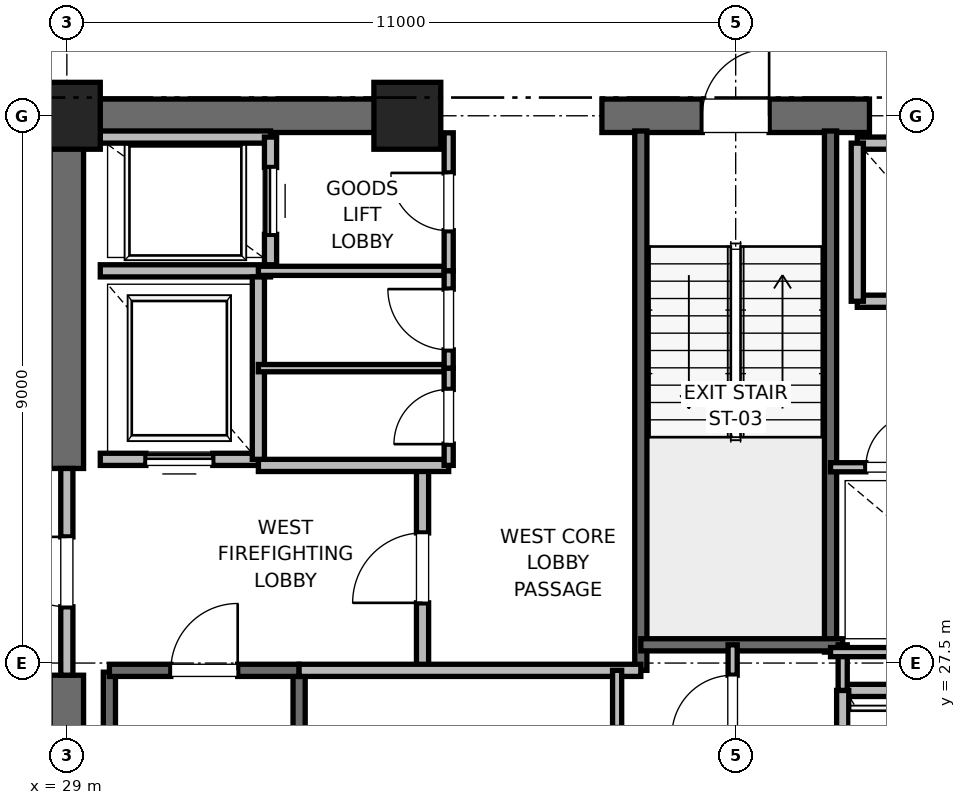
"""IFC4 building model, lengths in metres.
Left out: names, types, materials, properties, quantities, classifications, styles, units other than length and angle.
Written with IfcOpenShell. Run it as: python <this file> out.ifc"""

import sys

from ifc_helpers import new_model, si_unit, direction, frame, frame_2d, origin, origin_2d, place, context, subcontext, project, spatial, rectangle, extrude, element, fill, save


model = new_model("IFC4")
c1 = context("Model", 3, precision=1e-05, world=origin(), true_north=direction((0.0, 1.0)))
c2 = subcontext(c1, "Body", "Model", "MODEL_VIEW")
j1 = project(units=[si_unit("LENGTHUNIT", "METRE"), si_unit("PLANEANGLEUNIT", "RADIAN")], contexts=[c1])
p1 = place(None, origin())
s1 = spatial("IfcSite", under=j1, at=p1, CompositionType="ELEMENT")
p2 = place(p1, origin())
s2 = spatial("IfcBuilding", under=s1, at=p2, CompositionType="ELEMENT")
p3 = place(p2, frame((0.0, 0.0, 160.4)))
s3 = spatial("IfcBuildingStorey", under=s2, at=p3, CompositionType="ELEMENT", Elevation=160.4)
for number, where, z_axis, x_axis in (
    (1, (29.0, 36.5, 0.0), (0.0, 0.0, 1.0), (1.0, 0.0, 0.0)),
    (2, (34.6, 36.5, 0.0), (0.0, 0.0, 1.0), (1.0, 0.0, 0.0)),
):
    element("IfcColumn", number, at=place(p3, frame(where, z_axis=z_axis, x_axis=x_axis)), inside=s3, PredefinedType="PILASTER", context=c2, shape_type="SweptSolid", body=[
        extrude(rectangle(XDim=1.1, YDim=1.1, at=origin_2d()), origin(), (0.0, 0.0, 1.0), 4.0),
    ])
p4 = place(p3, frame((29.0, 36.5, 0.0), z_axis=(0.0, 0.0, 1.0), x_axis=(1.0, 0.0, 0.0)))
e3 = element("IfcWall", 3, at=p4, inside=s3, PredefinedType="SHEAR", context=c2, shape_type="SweptSolid", body=[
    extrude(rectangle(XDim=5.8, YDim=0.55, at=frame_2d((2.9, 0.0))), origin(), (0.0, 0.0, 1.0), 3.775),
])
p5 = place(p3, frame((37.8, 36.5, 0.0), z_axis=(0.0, 0.0, 1.0), x_axis=(1.0, 0.0, 0.0)))
e4 = element("IfcWall", 4, at=p5, inside=s3, PredefinedType="SHEAR", context=c2, shape_type="SweptSolid", body=[
    extrude(rectangle(XDim=4.4, YDim=0.55, at=frame_2d((2.2, 0.0))), origin(), (0.0, 0.0, 1.0), 3.775),
])
p6 = place(p5, frame((1.65, 0.0, 0.0)))
e5 = element("IfcOpeningElement", 5, at=p6, cuts=e4, PredefinedType="OPENING", context=c2, shape_type="SweptSolid", body=[
    extrude(rectangle(XDim=1.1, YDim=2.15, at=frame_2d((0.55, 1.075))), frame((0.0, 0.275, 0.0), z_axis=(0.0, -1.0, 0.0), x_axis=(1.0, 0.0, 0.0)), (0.0, 0.0, 1.0), 0.55),
])
p7 = place(p3, frame((29.0, 18.5, 0.0), z_axis=(0.0, 0.0, 1.0), x_axis=(0.0, 1.0, 0.0)))
e6 = element("IfcWall", 6, at=p7, inside=s3, PredefinedType="SHEAR", context=c2, shape_type="SweptSolid", body=[
    extrude(rectangle(XDim=8.8, YDim=0.55, at=frame_2d((4.4, 0.0))), origin(), (0.0, 0.0, 1.0), 3.775),
])
p8 = place(p3, frame((29.0, 30.7, 0.0), z_axis=(0.0, 0.0, 1.0), x_axis=(0.0, 1.0, 0.0)))
e7 = element("IfcWall", 7, at=p8, inside=s3, PredefinedType="SHEAR", context=c2, shape_type="SweptSolid", body=[
    extrude(rectangle(XDim=5.8, YDim=0.55, at=frame_2d((2.9, 0.0))), origin(), (0.0, 0.0, 1.0), 3.775),
])
p9 = place(p3, frame((29.7, 19.2, 0.0), z_axis=(0.0, 0.0, 1.0), x_axis=(0.0, 1.0, 0.0)))
e8 = element("IfcWall", 8, at=p9, inside=s3, PredefinedType="SOLIDWALL", context=c2, shape_type="SweptSolid", body=[
    extrude(rectangle(XDim=8.15, YDim=0.2, at=frame_2d((4.075, 0.0))), origin(), (0.0, 0.0, 1.0), 3.775),
])
p10 = place(p3, frame((32.82, 18.6, 0.0), z_axis=(0.0, 0.0, 1.0), x_axis=(0.0, 1.0, 0.0)))
e9 = element("IfcWall", 9, at=p10, inside=s3, PredefinedType="SOLIDWALL", context=c2, shape_type="SweptSolid", body=[
    extrude(rectangle(XDim=8.78, YDim=0.2, at=frame_2d((4.39, 0.0))), origin(), (0.0, 0.0, 1.0), 3.775),
])
p11 = place(p3, frame((29.7, 27.38, 0.0), z_axis=(0.0, 0.0, 1.0), x_axis=(1.0, 0.0, 0.0)))
e10 = element("IfcWall", 10, at=p11, inside=s3, PredefinedType="SOLIDWALL", context=c2, shape_type="SweptSolid", body=[
    extrude(rectangle(XDim=3.12, YDim=0.2, at=frame_2d((1.56, 0.0))), origin(), (0.0, 0.0, 1.0), 3.775),
])
p12 = place(p11, frame((1.01, 0.0, 0.0)))
e11 = element("IfcOpeningElement", 11, at=p12, cuts=e10, PredefinedType="OPENING", context=c2, shape_type="SweptSolid", body=[
    extrude(rectangle(XDim=1.1, YDim=2.15, at=frame_2d((0.55, 1.075))), frame((0.0, 0.1, 0.0), z_axis=(0.0, -1.0, 0.0), x_axis=(1.0, 0.0, 0.0)), (0.0, 0.0, 1.0), 0.2),
])
p13 = place(p3, frame((38.44, 27.38, 0.0), z_axis=(0.0, 0.0, 1.0), x_axis=(0.0, 1.0, 0.0)))
e12 = element("IfcWall", 12, at=p13, inside=s3, PredefinedType="SOLIDWALL", context=c2, shape_type="SweptSolid", body=[
    extrude(rectangle(XDim=8.87, YDim=0.2, at=frame_2d((4.435, 0.0))), origin(), (0.0, 0.0, 1.0), 3.775),
])
p14 = place(p3, frame((41.56, 27.68, 0.0), z_axis=(0.0, 0.0, 1.0), x_axis=(0.0, 1.0, 0.0)))
e13 = element("IfcWall", 13, at=p14, inside=s3, PredefinedType="SOLIDWALL", context=c2, shape_type="SweptSolid", body=[
    extrude(rectangle(XDim=8.57, YDim=0.2, at=frame_2d((4.285, 0.0))), origin(), (0.0, 0.0, 1.0), 3.775),
])
p15 = place(p3, frame((38.44, 27.8, 0.0), z_axis=(0.0, 0.0, 1.0), x_axis=(1.0, 0.0, 0.0)))
e14 = element("IfcWall", 14, at=p15, inside=s3, PredefinedType="SOLIDWALL", context=c2, shape_type="SweptSolid", body=[
    extrude(rectangle(XDim=3.32, YDim=0.2, at=frame_2d((1.66, 0.0))), origin(), (0.0, 0.0, 1.0), 3.775),
])
p16 = place(p3, frame((34.85, 27.38, 0.0), z_axis=(0.0, 0.0, 1.0), x_axis=(0.0, 1.0, 0.0)))
e15 = element("IfcWall", 15, at=p16, inside=s3, PredefinedType="PARTITIONING", context=c2, shape_type="SweptSolid", body=[
    extrude(rectangle(XDim=3.37, YDim=0.2, at=frame_2d((1.685, 0.0))), origin(), (0.0, 0.0, 1.0), 3.775),
])
p17 = place(p16, frame((1.11, 0.0, 0.0)))
e16 = element("IfcOpeningElement", 16, at=p17, cuts=e15, PredefinedType="OPENING", context=c2, shape_type="SweptSolid", body=[
    extrude(rectangle(XDim=1.15, YDim=2.2, at=frame_2d((0.575, 1.1))), frame((0.0, 0.1, 0.0), z_axis=(0.0, -1.0, 0.0), x_axis=(1.0, 0.0, 0.0)), (0.0, 0.0, 1.0), 0.2),
])
p18 = place(p3, frame((29.0, 27.3, 0.0), z_axis=(0.0, 0.0, 1.0), x_axis=(0.0, 1.0, 0.0)))
e17 = element("IfcWall", 17, at=p18, inside=s3, PredefinedType="PARTITIONING", context=c2, shape_type="SweptSolid", body=[
    extrude(rectangle(XDim=3.4, YDim=0.2, at=frame_2d((1.7, 0.0))), origin(), (0.0, 0.0, 1.0), 2.755),
])
p19 = place(p18, frame((1.125, 0.0, 0.0)))
e18 = element("IfcOpeningElement", 18, at=p19, cuts=e17, PredefinedType="OPENING", context=c2, shape_type="SweptSolid", body=[
    extrude(rectangle(XDim=1.15, YDim=2.2, at=frame_2d((0.575, 1.1))), frame((0.0, 0.1, 0.0), z_axis=(0.0, -1.0, 0.0), x_axis=(1.0, 0.0, 0.0)), (0.0, 0.0, 1.0), 0.2),
])
p20 = place(p3, frame((32.82, 27.38, 0.0), z_axis=(0.0, 0.0, 1.0), x_axis=(1.0, 0.0, 0.0)))
e19 = element("IfcWall", 19, at=p20, inside=s3, PredefinedType="PARTITIONING", context=c2, shape_type="SweptSolid", body=[
    extrude(rectangle(XDim=5.62, YDim=0.2, at=frame_2d((2.81, 0.0))), origin(), (0.0, 0.0, 1.0), 3.775),
])
p21 = place(p3, frame((32.15, 30.75, 0.0), z_axis=(0.0, 0.0, 1.0), x_axis=(1.0, 0.0, 0.0)))
e20 = element("IfcWall", 20, at=p21, inside=s3, PredefinedType="PARTITIONING", context=c2, shape_type="SweptSolid", body=[
    extrude(rectangle(XDim=3.13, YDim=0.2, at=frame_2d((1.565, 0.0))), origin(), (0.0, 0.0, 1.0), 3.775),
])
p22 = place(p3, frame((29.55, 30.85, 0.0), z_axis=(0.0, 0.0, 1.0), x_axis=(1.0, 0.0, 0.0)))
e21 = element("IfcWall", 21, at=p22, inside=s3, PredefinedType="SOLIDWALL", context=c2, shape_type="SweptSolid", body=[
    extrude(rectangle(XDim=2.6, YDim=0.2, at=frame_2d((1.3, 0.0))), origin(), (0.0, 0.0, 1.0), 2.755),
])
p23 = place(p22, frame((0.75, 0.0, 0.0)))
e22 = element("IfcOpeningElement", 22, at=p23, cuts=e21, PredefinedType="OPENING", context=c2, shape_type="SweptSolid", body=[
    extrude(rectangle(XDim=1.1, YDim=2.2, at=frame_2d((0.55, 1.1))), frame((0.0, 0.1, 0.0), z_axis=(0.0, -1.0, 0.0), x_axis=(1.0, 0.0, 0.0)), (0.0, 0.0, 1.0), 0.2),
])
p24 = place(p3, frame((29.55, 33.95, 0.0), z_axis=(0.0, 0.0, 1.0), x_axis=(1.0, 0.0, 0.0)))
e23 = element("IfcWall", 23, at=p24, inside=s3, PredefinedType="SOLIDWALL", context=c2, shape_type="SweptSolid", body=[
    extrude(rectangle(XDim=2.8, YDim=0.2, at=frame_2d((1.4, 0.0))), origin(), (0.0, 0.0, 1.0), 3.775),
])
p25 = place(p3, frame((32.15, 30.85, 0.0), z_axis=(0.0, 0.0, 1.0), x_axis=(0.0, 1.0, 0.0)))
e24 = element("IfcWall", 24, at=p25, inside=s3, PredefinedType="SOLIDWALL", context=c2, shape_type="SweptSolid", body=[
    extrude(rectangle(XDim=3.0, YDim=0.2, at=frame_2d((1.5, 0.0))), origin(), (0.0, 0.0, 1.0), 3.775),
])
p26 = place(p3, frame((32.35, 36.15, 0.0), z_axis=(0.0, 0.0, 1.0), x_axis=(-1.0, 0.0, 0.0)))
e25 = element("IfcWall", 25, at=p26, inside=s3, PredefinedType="SOLIDWALL", context=c2, shape_type="SweptSolid", body=[
    extrude(rectangle(XDim=2.8, YDim=0.2, at=frame_2d((1.4, 0.0))), origin(), (0.0, 0.0, 1.0), 2.985),
])
p27 = place(p3, frame((32.35, 34.05, 0.0), z_axis=(0.0, 0.0, 1.0), x_axis=(0.0, 1.0, 0.0)))
e26 = element("IfcWall", 26, at=p27, inside=s3, PredefinedType="SOLIDWALL", context=c2, shape_type="SweptSolid", body=[
    extrude(rectangle(XDim=2.1, YDim=0.2, at=frame_2d((1.05, 0.0))), origin(), (0.0, 0.0, 1.0), 3.775),
])
p28 = place(p27, frame((0.5, 0.0, 0.0)))
e27 = element("IfcOpeningElement", 27, at=p28, cuts=e26, PredefinedType="OPENING", context=c2, shape_type="SweptSolid", body=[
    extrude(rectangle(XDim=1.1, YDim=2.2, at=frame_2d((0.55, 1.1))), frame((0.0, 0.1, 0.0), z_axis=(0.0, -1.0, 0.0), x_axis=(1.0, 0.0, 0.0)), (0.0, 0.0, 1.0), 0.2),
])
p29 = place(p3, frame((43.44, 27.05, 0.0), z_axis=(0.0, 0.0, 1.0), x_axis=(-1.0, 0.0, 0.0)))
e28 = element("IfcWall", 28, at=p29, inside=s3, PredefinedType="SOLIDWALL", context=c2, shape_type="SweptSolid", body=[
    extrude(rectangle(XDim=1.68, YDim=0.2, at=frame_2d((0.84, 0.0))), origin(), (0.0, 0.0, 1.0), 3.775),
])
p30 = place(p3, frame((41.76, 27.05, 0.0), z_axis=(0.0, 0.0, 1.0), x_axis=(0.0, -1.0, 0.0)))
e29 = element("IfcWall", 29, at=p30, inside=s3, PredefinedType="SOLIDWALL", context=c2, shape_type="SweptSolid", body=[
    extrude(rectangle(XDim=2.6, YDim=0.2, at=frame_2d((1.3, 0.0))), origin(), (0.0, 0.0, 1.0), 3.775),
])
p31 = place(p3, frame((42.0, 33.45, 0.0), z_axis=(0.0, 0.0, 1.0), x_axis=(1.0, 0.0, 0.0)))
e30 = element("IfcWall", 30, at=p31, inside=s3, PredefinedType="SOLIDWALL", context=c2, shape_type="SweptSolid", body=[
    extrude(rectangle(XDim=2.3, YDim=0.2, at=frame_2d((1.15, 0.0))), origin(), (0.0, 0.0, 1.0), 3.775),
])
p32 = place(p3, frame((44.3, 36.05, 0.0), z_axis=(0.0, 0.0, 1.0), x_axis=(-1.0, 0.0, 0.0)))
e31 = element("IfcWall", 31, at=p32, inside=s3, PredefinedType="SOLIDWALL", context=c2, shape_type="SweptSolid", body=[
    extrude(rectangle(XDim=2.3, YDim=0.2, at=frame_2d((1.15, 0.0))), origin(), (0.0, 0.0, 1.0), 2.755),
])
p33 = place(p3, frame((42.0, 36.05, 0.0), z_axis=(0.0, 0.0, 1.0), x_axis=(0.0, -1.0, 0.0)))
e32 = element("IfcWall", 32, at=p33, inside=s3, PredefinedType="SOLIDWALL", context=c2, shape_type="SweptSolid", body=[
    extrude(rectangle(XDim=2.6, YDim=0.2, at=frame_2d((1.3, 0.0))), origin(), (0.0, 0.0, 1.0), 2.755),
])
p34 = place(p3, frame((41.76, 27.05, 0.0), z_axis=(0.0, 0.0, 1.0), x_axis=(0.0, 1.0, 0.0)))
e33 = element("IfcWall", 33, at=p34, inside=s3, PredefinedType="PARTITIONING", context=c2, shape_type="SweptSolid", body=[
    extrude(rectangle(XDim=0.75, YDim=0.15, at=frame_2d((0.375, 0.0))), origin(), (0.0, 0.0, 1.0), 2.85),
])
p35 = place(p3, frame((39.95, 25.8, 0.0), z_axis=(0.0, 0.0, 1.0), x_axis=(0.0, 1.0, 0.0)))
e34 = element("IfcWall", 34, at=p35, inside=s3, PredefinedType="PARTITIONING", context=c2, shape_type="SweptSolid", body=[
    extrude(rectangle(XDim=2.0, YDim=0.15, at=frame_2d((1.0, 0.0))), origin(), (0.0, 0.0, 1.0), 2.85),
])
p36 = place(p35, frame((0.5, 0.0, 0.0)))
e35 = element("IfcOpeningElement", 35, at=p36, cuts=e34, PredefinedType="OPENING", context=c2, shape_type="SweptSolid", body=[
    extrude(rectangle(XDim=1.0, YDim=2.15, at=frame_2d((0.5, 1.075))), frame((0.0, 0.075, 0.0), z_axis=(0.0, -1.0, 0.0), x_axis=(1.0, 0.0, 0.0)), (0.0, 0.0, 1.0), 0.15),
])
p37 = place(p3, frame((32.15, 33.95, 0.0), z_axis=(0.0, 0.0, 1.0), x_axis=(1.0, 0.0, 0.0)))
e36 = element("IfcWall", 36, at=p37, inside=s3, PredefinedType="PARTITIONING", context=c2, shape_type="SweptSolid", body=[
    extrude(rectangle(XDim=3.13, YDim=0.15, at=frame_2d((1.565, 0.0))), origin(), (0.0, 0.0, 1.0), 2.85),
])
p38 = place(p3, frame((35.28, 33.95, 0.0), z_axis=(0.0, 0.0, 1.0), x_axis=(0.0, 1.0, 0.0)))
e37 = element("IfcWall", 37, at=p38, inside=s3, PredefinedType="PARTITIONING", context=c2, shape_type="SweptSolid", body=[
    extrude(rectangle(XDim=2.27, YDim=0.15, at=frame_2d((1.135, 0.0))), origin(), (0.0, 0.0, 1.0), 2.755),
])
p39 = place(p38, frame((0.66, 0.0, 0.0)))
e38 = element("IfcOpeningElement", 38, at=p39, cuts=e37, PredefinedType="OPENING", context=c2, shape_type="SweptSolid", body=[
    extrude(rectangle(XDim=0.95, YDim=2.15, at=frame_2d((0.475, 1.075))), frame((0.0, 0.075, 0.0), z_axis=(0.0, -1.0, 0.0), x_axis=(1.0, 0.0, 0.0)), (0.0, 0.0, 1.0), 0.15),
])
p40 = place(p3, frame((32.15, 32.35, 0.0), z_axis=(0.0, 0.0, 1.0), x_axis=(1.0, 0.0, 0.0)))
e39 = element("IfcWall", 39, at=p40, inside=s3, PredefinedType="PARTITIONING", context=c2, shape_type="SweptSolid", body=[
    extrude(rectangle(XDim=3.13, YDim=0.12, at=frame_2d((1.565, 0.0))), origin(), (0.0, 0.0, 1.0), 2.85),
])
p41 = place(p3, frame((35.28, 30.75, 0.0), z_axis=(0.0, 0.0, 1.0), x_axis=(0.0, 1.0, 0.0)))
e40 = element("IfcWall", 40, at=p41, inside=s3, PredefinedType="PARTITIONING", context=c2, shape_type="SweptSolid", body=[
    extrude(rectangle(XDim=1.6, YDim=0.15, at=frame_2d((0.8, 0.0))), origin(), (0.0, 0.0, 1.0), 2.85),
])
p42 = place(p41, frame((0.35, 0.0, 0.0)))
e41 = element("IfcOpeningElement", 41, at=p42, cuts=e40, PredefinedType="OPENING", context=c2, shape_type="SweptSolid", body=[
    extrude(rectangle(XDim=0.9, YDim=2.1, at=frame_2d((0.45, 1.05))), frame((0.0, 0.075, 0.0), z_axis=(0.0, -1.0, 0.0), x_axis=(1.0, 0.0, 0.0)), (0.0, 0.0, 1.0), 0.15),
])
p43 = place(p3, frame((35.28, 32.35, 0.0), z_axis=(0.0, 0.0, 1.0), x_axis=(0.0, 1.0, 0.0)))
e42 = element("IfcWall", 42, at=p43, inside=s3, PredefinedType="PARTITIONING", context=c2, shape_type="SweptSolid", body=[
    extrude(rectangle(XDim=1.6, YDim=0.15, at=frame_2d((0.8, 0.0))), origin(), (0.0, 0.0, 1.0), 2.85),
])
p44 = place(p43, frame((0.3, 0.0, 0.0)))
e43 = element("IfcOpeningElement", 43, at=p44, cuts=e42, PredefinedType="OPENING", context=c2, shape_type="SweptSolid", body=[
    extrude(rectangle(XDim=1.0, YDim=2.15, at=frame_2d((0.5, 1.075))), frame((0.0, 0.075, 0.0), z_axis=(0.0, -1.0, 0.0), x_axis=(1.0, 0.0, 0.0)), (0.0, 0.0, 1.0), 0.15),
])
p45 = place(p3, frame((38.05, 24.5, 0.0), z_axis=(0.0, 0.0, 1.0), x_axis=(0.0, 1.0, 0.0)))
e44 = element("IfcWall", 44, at=p45, inside=s3, PredefinedType="PARTITIONING", context=c2, shape_type="SweptSolid", body=[
    extrude(rectangle(XDim=2.88, YDim=0.15, at=frame_2d((1.44, 0.0))), origin(), (0.0, 0.0, 1.0), 2.85),
])
p46 = place(p45, frame((0.94, 0.0, 0.0)))
e45 = element("IfcOpeningElement", 45, at=p46, cuts=e44, PredefinedType="OPENING", context=c2, shape_type="SweptSolid", body=[
    extrude(rectangle(XDim=1.0, YDim=2.15, at=frame_2d((0.5, 1.075))), frame((0.0, 0.075, 0.0), z_axis=(0.0, -1.0, 0.0), x_axis=(1.0, 0.0, 0.0)), (0.0, 0.0, 1.0), 0.15),
])
p47 = place(p3, frame((41.56, 27.68, 0.0), z_axis=(0.0, 0.0, 1.0), x_axis=(1.0, 0.0, 0.0)))
e46 = element("IfcWall", 46, at=p47, inside=s3, PredefinedType="PARTITIONING", context=c2, shape_type="SweptSolid", body=[
    extrude(rectangle(XDim=3.59, YDim=0.15, at=frame_2d((1.795, 0.0))), origin(), (0.0, 0.0, 1.0), 2.85),
])
p48 = place(p3, frame((41.56, 30.72, 0.0), z_axis=(0.0, 0.0, 1.0), x_axis=(1.0, 0.0, 0.0)))
e47 = element("IfcWall", 47, at=p48, inside=s3, PredefinedType="PARTITIONING", context=c2, shape_type="SweptSolid", body=[
    extrude(rectangle(XDim=2.04, YDim=0.15, at=frame_2d((1.02, 0.0))), origin(), (0.0, 0.0, 1.0), 2.85),
])
p49 = place(p48, frame((0.58, 0.0, 0.0)))
e48 = element("IfcOpeningElement", 48, at=p49, cuts=e47, PredefinedType="OPENING", context=c2, shape_type="SweptSolid", body=[
    extrude(rectangle(XDim=0.88, YDim=2.1, at=frame_2d((0.44, 1.05))), frame((0.0, 0.075, 0.0), z_axis=(0.0, -1.0, 0.0), x_axis=(1.0, 0.0, 0.0)), (0.0, 0.0, 1.0), 0.15),
])
p50 = place(p12, origin())
e49 = element("IfcDoor", 49, at=p50, inside=s3, OperationType="SINGLE_SWING_RIGHT", PredefinedType="DOOR", context=c2, shape_type="SweptSolid", body=[
    extrude(rectangle(XDim=1.1, YDim=2.15, at=frame_2d((0.55, 1.075))), frame((0.0, 0.025, 0.0), z_axis=(0.0, -1.0, 0.0), x_axis=(1.0, 0.0, 0.0)), (0.0, 0.0, 1.0), 0.05),
])
fill(e11, e49)
p51 = place(p6, origin())
e50 = element("IfcDoor", 50, at=p51, inside=s3, OperationType="SINGLE_SWING_RIGHT", PredefinedType="DOOR", context=c2, shape_type="SweptSolid", body=[
    extrude(rectangle(XDim=1.1, YDim=2.15, at=frame_2d((0.55, 1.075))), frame((0.0, 0.025, 0.0), z_axis=(0.0, -1.0, 0.0), x_axis=(1.0, 0.0, 0.0)), (0.0, 0.0, 1.0), 0.05),
])
fill(e5, e50)
p52 = place(p17, origin())
e51 = element("IfcDoor", 51, at=p52, inside=s3, OperationType="SINGLE_SWING_LEFT", PredefinedType="DOOR", context=c2, shape_type="SweptSolid", body=[
    extrude(rectangle(XDim=1.15, YDim=2.2, at=frame_2d((0.575, 1.1))), frame((0.0, 0.025, 0.0), z_axis=(0.0, -1.0, 0.0), x_axis=(1.0, 0.0, 0.0)), (0.0, 0.0, 1.0), 0.05),
])
fill(e16, e51)
p53 = place(p19, origin())
e52 = element("IfcDoor", 52, at=p53, inside=s3, OperationType="SINGLE_SWING_RIGHT", PredefinedType="DOOR", context=c2, shape_type="SweptSolid", body=[
    extrude(rectangle(XDim=1.15, YDim=2.2, at=frame_2d((0.575, 1.1))), frame((0.0, 0.025, 0.0), z_axis=(0.0, -1.0, 0.0), x_axis=(1.0, 0.0, 0.0)), (0.0, 0.0, 1.0), 0.05),
])
fill(e18, e52)
p54 = place(p23, origin())
e53 = element("IfcDoor", 53, at=p54, inside=s3, OperationType="SLIDING_TO_RIGHT", PredefinedType="DOOR", context=c2, shape_type="SweptSolid", body=[
    extrude(rectangle(XDim=1.1, YDim=2.2, at=frame_2d((0.55, 1.1))), frame((0.0, 0.025, 0.0), z_axis=(0.0, -1.0, 0.0), x_axis=(1.0, 0.0, 0.0)), (0.0, 0.0, 1.0), 0.05),
])
fill(e22, e53)
p55 = place(p28, origin())
e54 = element("IfcDoor", 54, at=p55, inside=s3, OperationType="SLIDING_TO_RIGHT", PredefinedType="DOOR", context=c2, shape_type="SweptSolid", body=[
    extrude(rectangle(XDim=1.1, YDim=2.2, at=frame_2d((0.55, 1.1))), frame((0.0, 0.025, 0.0), z_axis=(0.0, -1.0, 0.0), x_axis=(1.0, 0.0, 0.0)), (0.0, 0.0, 1.0), 0.05),
])
fill(e27, e54)
p56 = place(p36, origin())
e55 = element("IfcDoor", 55, at=p56, inside=s3, OperationType="SINGLE_SWING_LEFT", PredefinedType="DOOR", context=c2, shape_type="SweptSolid", body=[
    extrude(rectangle(XDim=1.0, YDim=2.15, at=frame_2d((0.5, 1.075))), frame((0.0, 0.025, 0.0), z_axis=(0.0, -1.0, 0.0), x_axis=(1.0, 0.0, 0.0)), (0.0, 0.0, 1.0), 0.05),
])
fill(e35, e55)
p57 = place(p39, origin())
e56 = element("IfcDoor", 56, at=p57, inside=s3, OperationType="SINGLE_SWING_RIGHT", PredefinedType="DOOR", context=c2, shape_type="SweptSolid", body=[
    extrude(rectangle(XDim=0.95, YDim=2.15, at=frame_2d((0.475, 1.075))), frame((0.0, 0.025, 0.0), z_axis=(0.0, -1.0, 0.0), x_axis=(1.0, 0.0, 0.0)), (0.0, 0.0, 1.0), 0.05),
])
fill(e38, e56)
p58 = place(p42, origin())
e57 = element("IfcDoor", 57, at=p58, inside=s3, OperationType="SINGLE_SWING_LEFT", PredefinedType="DOOR", context=c2, shape_type="SweptSolid", body=[
    extrude(rectangle(XDim=0.9, YDim=2.1, at=frame_2d((0.45, 1.05))), frame((0.0, 0.025, 0.0), z_axis=(0.0, -1.0, 0.0), x_axis=(1.0, 0.0, 0.0)), (0.0, 0.0, 1.0), 0.05),
])
fill(e41, e57)
p59 = place(p44, origin())
e58 = element("IfcDoor", 58, at=p59, inside=s3, OperationType="SINGLE_SWING_RIGHT", PredefinedType="DOOR", context=c2, shape_type="SweptSolid", body=[
    extrude(rectangle(XDim=1.0, YDim=2.15, at=frame_2d((0.5, 1.075))), frame((0.0, 0.025, 0.0), z_axis=(0.0, -1.0, 0.0), x_axis=(1.0, 0.0, 0.0)), (0.0, 0.0, 1.0), 0.05),
])
fill(e43, e58)
p60 = place(p49, origin())
e59 = element("IfcDoor", 59, at=p60, inside=s3, OperationType="SINGLE_SWING_RIGHT", PredefinedType="DOOR", context=c2, shape_type="SweptSolid", body=[
    extrude(rectangle(XDim=0.88, YDim=2.1, at=frame_2d((0.44, 1.05))), frame((0.0, 0.025, 0.0), z_axis=(0.0, -1.0, 0.0), x_axis=(1.0, 0.0, 0.0)), (0.0, 0.0, 1.0), 0.05),
])
fill(e48, e59)
save(model, sys.argv[1])
